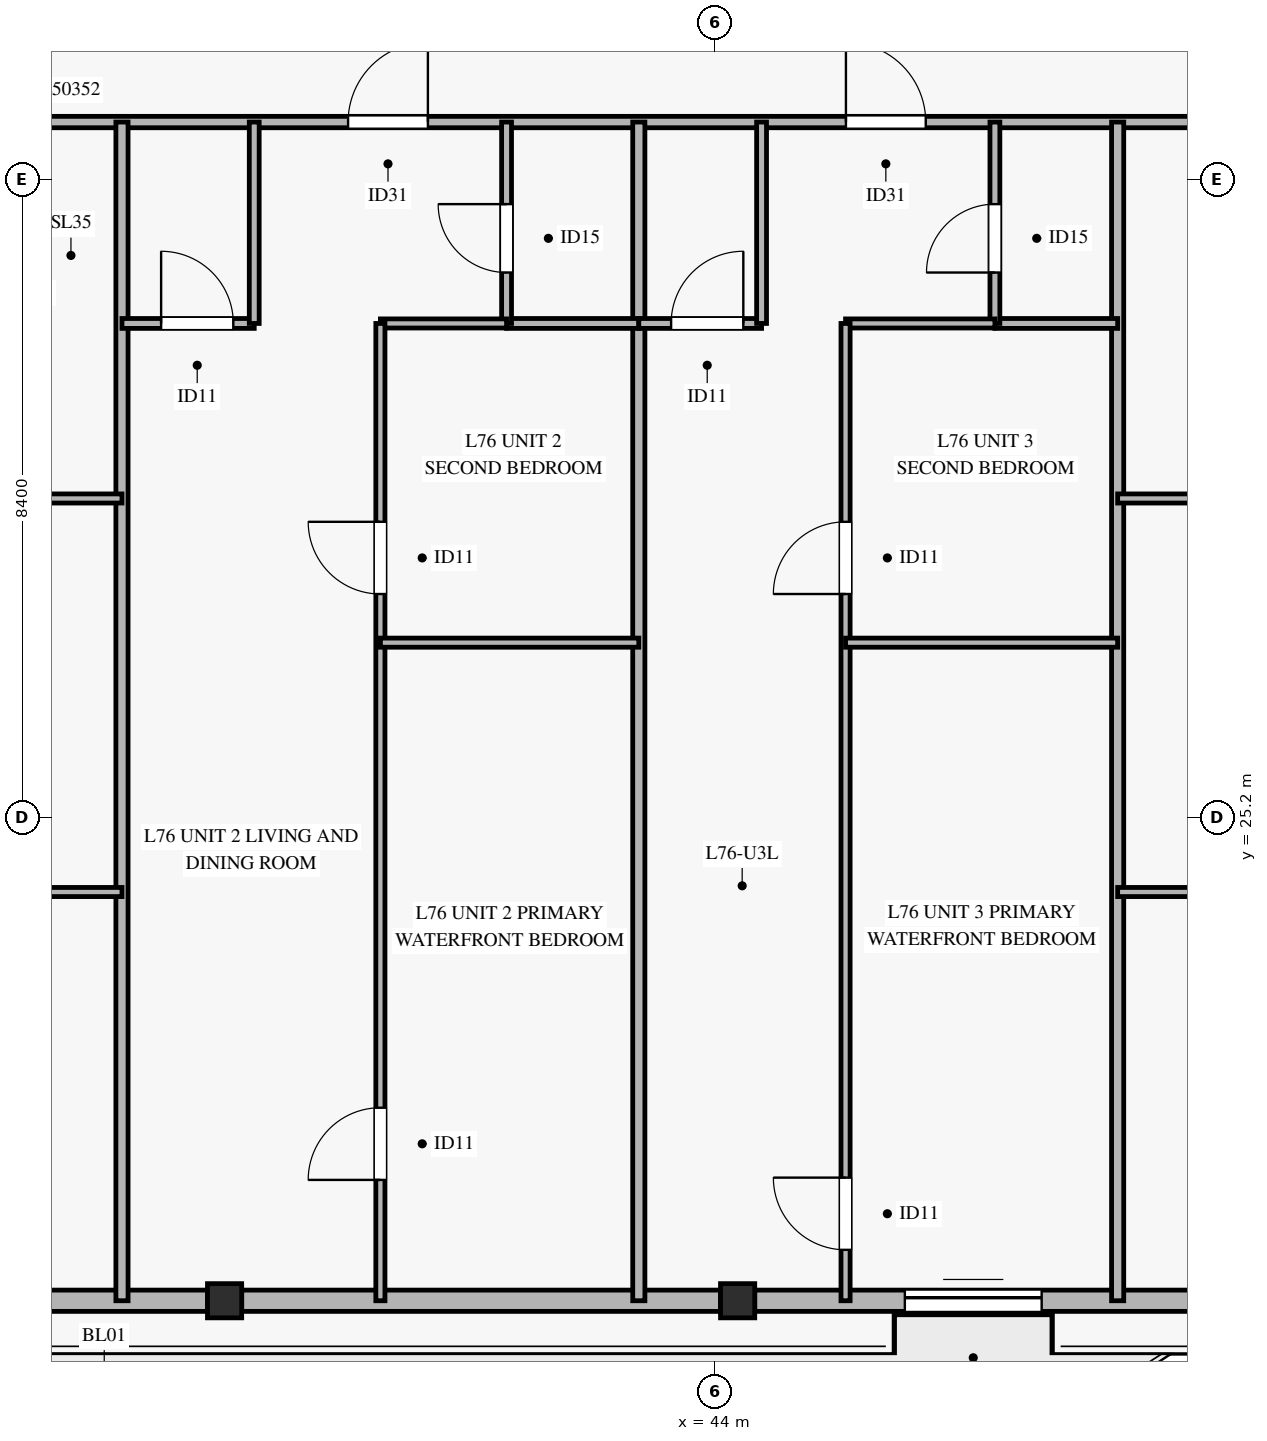
"""IFC4 building model, lengths in metres.
Left out: names, types, materials, properties, quantities, classifications, styles, units other than length and angle.
Written with IfcOpenShell. Run it as: python <this file> out.ifc"""

import sys

from ifc_helpers import new_model, si_unit, direction, frame, frame_2d, origin, origin_2d, place, context, subcontext, project, spatial, rectangle, hollow_rectangle, extrude, source, transform, mapped, element, fill, save


model = new_model("IFC4")
c1 = context("Model", 3, precision=1e-05, world=origin(), true_north=direction((0.0, 1.0)))
c2 = subcontext(c1, "Body", "Model", "MODEL_VIEW")
j1 = project(units=[si_unit("LENGTHUNIT", "METRE"), si_unit("PLANEANGLEUNIT", "RADIAN")], contexts=[c1])
p1 = place(None, origin())
s1 = spatial("IfcSite", under=j1, at=p1, CompositionType="ELEMENT")
p2 = place(p1, origin())
s2 = spatial("IfcBuilding", under=s1, at=p2, CompositionType="ELEMENT")
p3 = place(p2, frame((0.0, 0.0, 297.2)))
s3 = spatial("IfcBuildingStorey", under=s2, at=p3, CompositionType="ELEMENT", Elevation=297.2)
m1 = source(origin(), c2, "Body", "SweptSolid", [
    extrude(hollow_rectangle(XDim=0.45, YDim=0.45, WallThickness=0.022, at=origin_2d()), origin(), (0.0, 0.0, 1.0), 3.185),
])
for number, where, z_axis, x_axis in (
    (1, (37.55, 18.841, 0.0), (0.0, 0.0, 1.0), (1.0, 0.0, 0.0)),
    (2, (44.3, 18.841, 0.0), (0.0, 0.0, 1.0), (1.0, 0.0, 0.0)),
):
    element("IfcColumn", number, at=place(p3, frame(where, z_axis=z_axis, x_axis=x_axis)), inside=s3, PredefinedType="COLUMN", context=c2, shape_type="MappedRepresentation", body=[
        mapped(m1, transform((0.0, 0.0, 0.0), x_axis=(1.0, 0.0, 0.0), y_axis=(0.0, 1.0, 0.0), z_axis=(0.0, 0.0, 1.0), scale=1.0)),
    ])
for number, where, z_axis, x_axis in (
    (3, (31.025, 18.841, 0.0), (0.0, 0.0, 1.0), (1.0, 0.0, 0.0)),
    (4, (37.775, 18.841, 0.0), (0.0, 0.0, 1.0), (1.0, 0.0, 0.0)),
):
    element("IfcWall", number, at=place(p3, frame(where, z_axis=z_axis, x_axis=x_axis)), inside=s3, PredefinedType="SOLIDWALL", context=c2, shape_type="SweptSolid", body=[
        extrude(rectangle(XDim=6.3, YDim=0.28, at=frame_2d((3.15, 0.0))), origin(), (0.0, 0.0, 1.0), 2.815),
    ])
p4 = place(p3, frame((44.525, 18.841, 0.0), z_axis=(0.0, 0.0, 1.0), x_axis=(1.0, 0.0, 0.0)))
e5 = element("IfcWall", 5, at=p4, inside=s3, PredefinedType="SOLIDWALL", context=c2, shape_type="SweptSolid", body=[
    extrude(rectangle(XDim=5.8, YDim=0.28, at=frame_2d((2.9, 0.0))), origin(), (0.0, 0.0, 1.0), 2.815),
])
p5 = place(p4, frame((1.975, 0.0, 0.0)))
e6 = element("IfcOpeningElement", 6, at=p5, cuts=e5, PredefinedType="OPENING", context=c2, shape_type="SweptSolid", body=[
    extrude(rectangle(XDim=1.8, YDim=2.25, at=frame_2d((0.9, 1.125))), frame((0.0, 0.15, 0.0), z_axis=(0.0, -1.0, 0.0), x_axis=(1.0, 0.0, 0.0)), (0.0, 0.0, 1.0), 0.3),
])
p6 = place(p3, frame((10.024, 34.35, 0.0), z_axis=(0.0, 0.0, 1.0), x_axis=(1.0, 0.0, 0.0)))
e7 = element("IfcWall", 7, at=p6, inside=s3, PredefinedType="PARTITIONING", context=c2, shape_type="SweptSolid", body=[
    extrude(rectangle(XDim=50.352, YDim=0.15, at=frame_2d((25.176, 0.0))), origin(), (0.0, 0.0, 1.0), 2.47),
])
p7 = place(p6, frame((5.148, 0.0, 0.0)))
e8 = element("IfcOpeningElement", 8, at=p7, cuts=e7, PredefinedType="OPENING", context=c2, shape_type="SweptSolid", body=[
    extrude(rectangle(XDim=1.05, YDim=2.15, at=frame_2d((0.525, 1.075))), frame((0.0, 0.085, 0.0), z_axis=(0.0, -1.0, 0.0), x_axis=(1.0, 0.0, 0.0)), (0.0, 0.0, 1.0), 0.17),
])
p8 = place(p6, frame((15.651, 0.0, 0.0)))
e9 = element("IfcOpeningElement", 9, at=p8, cuts=e7, PredefinedType="OPENING", context=c2, shape_type="SweptSolid", body=[
    extrude(rectangle(XDim=1.05, YDim=2.15, at=frame_2d((0.525, 1.075))), frame((0.0, 0.085, 0.0), z_axis=(0.0, -1.0, 0.0), x_axis=(1.0, 0.0, 0.0)), (0.0, 0.0, 1.0), 0.17),
])
p9 = place(p6, frame((22.129, 0.0, 0.0)))
e10 = element("IfcOpeningElement", 10, at=p9, cuts=e7, PredefinedType="OPENING", context=c2, shape_type="SweptSolid", body=[
    extrude(rectangle(XDim=1.05, YDim=2.15, at=frame_2d((0.525, 1.075))), frame((0.0, 0.085, 0.0), z_axis=(0.0, -1.0, 0.0), x_axis=(1.0, 0.0, 0.0)), (0.0, 0.0, 1.0), 0.17),
])
p10 = place(p6, frame((29.151, 0.0, 0.0)))
e11 = element("IfcOpeningElement", 11, at=p10, cuts=e7, PredefinedType="OPENING", context=c2, shape_type="SweptSolid", body=[
    extrude(rectangle(XDim=1.05, YDim=2.15, at=frame_2d((0.525, 1.075))), frame((0.0, 0.085, 0.0), z_axis=(0.0, -1.0, 0.0), x_axis=(1.0, 0.0, 0.0)), (0.0, 0.0, 1.0), 0.17),
])
p11 = place(p6, frame((35.701, 0.0, 0.0)))
e12 = element("IfcOpeningElement", 12, at=p11, cuts=e7, PredefinedType="OPENING", context=c2, shape_type="SweptSolid", body=[
    extrude(rectangle(XDim=1.05, YDim=2.15, at=frame_2d((0.525, 1.075))), frame((0.0, 0.085, 0.0), z_axis=(0.0, -1.0, 0.0), x_axis=(1.0, 0.0, 0.0)), (0.0, 0.0, 1.0), 0.17),
])
p12 = place(p6, frame((43.578, 0.0, 0.0)))
e13 = element("IfcOpeningElement", 13, at=p12, cuts=e7, PredefinedType="OPENING", context=c2, shape_type="SweptSolid", body=[
    extrude(rectangle(XDim=1.05, YDim=2.15, at=frame_2d((0.525, 1.075))), frame((0.0, 0.085, 0.0), z_axis=(0.0, -1.0, 0.0), x_axis=(1.0, 0.0, 0.0)), (0.0, 0.0, 1.0), 0.17),
])
for number, where, z_axis, x_axis in (
    (14, (36.2, 18.841, 0.0), (0.0, 0.0, 1.0), (0.0, 1.0, 0.0)),
    (15, (43.0, 18.841, 0.0), (0.0, 0.0, 1.0), (0.0, 1.0, 0.0)),
    (16, (49.3, 18.841, 0.0), (0.0, 0.0, 1.0), (0.0, 1.0, 0.0)),
):
    element("IfcWall", number, at=place(p3, frame(where, z_axis=z_axis, x_axis=x_axis)), inside=s3, PredefinedType="PARTITIONING", context=c2, shape_type="SweptSolid", body=[
        extrude(rectangle(XDim=15.509, YDim=0.16, at=frame_2d((7.754, 0.0))), origin(), (0.0, 0.0, 1.0), 2.77),
    ])
p13 = place(p3, frame((29.4, 24.219, 0.0), z_axis=(0.0, 0.0, 1.0), x_axis=(1.0, 0.0, 0.0)))
e17 = element("IfcWall", 17, at=p13, inside=s3, PredefinedType="PARTITIONING", context=c2, shape_type="SweptSolid", body=[
    extrude(rectangle(XDim=6.8, YDim=0.12, at=frame_2d((3.4, 0.0))), origin(), (0.0, 0.0, 1.0), 2.47),
])
p14 = place(p13, frame((2.886, 0.0, 0.0)))
e18 = element("IfcOpeningElement", 18, at=p14, cuts=e17, PredefinedType="OPENING", context=c2, shape_type="SweptSolid", body=[
    extrude(rectangle(XDim=0.95, YDim=2.1, at=frame_2d((0.475, 1.05))), frame((0.0, 0.07, 0.0), z_axis=(0.0, -1.0, 0.0), x_axis=(1.0, 0.0, 0.0)), (0.0, 0.0, 1.0), 0.14),
])
p15 = place(p3, frame((29.4, 29.397, 0.0), z_axis=(0.0, 0.0, 1.0), x_axis=(1.0, 0.0, 0.0)))
e19 = element("IfcWall", 19, at=p15, inside=s3, PredefinedType="PARTITIONING", context=c2, shape_type="SweptSolid", body=[
    extrude(rectangle(XDim=6.8, YDim=0.12, at=frame_2d((3.4, 0.0))), origin(), (0.0, 0.0, 1.0), 2.47),
])
p16 = place(p15, frame((2.886, 0.0, 0.0)))
e20 = element("IfcOpeningElement", 20, at=p16, cuts=e19, PredefinedType="OPENING", context=c2, shape_type="SweptSolid", body=[
    extrude(rectangle(XDim=0.95, YDim=2.1, at=frame_2d((0.475, 1.05))), frame((0.0, 0.07, 0.0), z_axis=(0.0, -1.0, 0.0), x_axis=(1.0, 0.0, 0.0)), (0.0, 0.0, 1.0), 0.14),
])
p17 = place(p3, frame((36.2, 31.7, 0.0), z_axis=(0.0, 0.0, 1.0), x_axis=(1.0, 0.0, 0.0)))
e21 = element("IfcWall", 21, at=p17, inside=s3, PredefinedType="PARTITIONING", context=c2, shape_type="SweptSolid", body=[
    extrude(rectangle(XDim=1.74, YDim=0.13, at=frame_2d((0.87, 0.0))), origin(), (0.0, 0.0, 1.0), 2.47),
])
p18 = place(p17, frame((0.515, 0.0, 0.0)))
e22 = element("IfcOpeningElement", 22, at=p18, cuts=e21, PredefinedType="OPENING", context=c2, shape_type="SweptSolid", body=[
    extrude(rectangle(XDim=0.95, YDim=2.1, at=frame_2d((0.475, 1.05))), frame((0.0, 0.075, 0.0), z_axis=(0.0, -1.0, 0.0), x_axis=(1.0, 0.0, 0.0)), (0.0, 0.0, 1.0), 0.15),
])
p19 = place(p3, frame((37.94, 31.7, 0.0), z_axis=(0.0, 0.0, 1.0), x_axis=(0.0, 1.0, 0.0)))
e23 = element("IfcWall", 23, at=p19, inside=s3, PredefinedType="PARTITIONING", context=c2, shape_type="SweptSolid", body=[
    extrude(rectangle(XDim=2.65, YDim=0.13, at=frame_2d((1.325, 0.0))), origin(), (0.0, 0.0, 1.0), 2.77),
])
p20 = place(p3, frame((41.26, 31.7, 0.0), z_axis=(0.0, 0.0, 1.0), x_axis=(1.0, 0.0, 0.0)))
e24 = element("IfcWall", 24, at=p20, inside=s3, PredefinedType="PARTITIONING", context=c2, shape_type="SweptSolid", body=[
    extrude(rectangle(XDim=1.74, YDim=0.13, at=frame_2d((0.87, 0.0))), origin(), (0.0, 0.0, 1.0), 3.185),
])
p21 = place(p3, frame((41.26, 31.7, 0.0), z_axis=(0.0, 0.0, 1.0), x_axis=(0.0, 1.0, 0.0)))
e25 = element("IfcWall", 25, at=p21, inside=s3, PredefinedType="PARTITIONING", context=c2, shape_type="SweptSolid", body=[
    extrude(rectangle(XDim=2.65, YDim=0.13, at=frame_2d((1.325, 0.0))), origin(), (0.0, 0.0, 1.0), 2.77),
])
p22 = place(p21, frame((0.67, 0.0, 0.0)))
e26 = element("IfcOpeningElement", 26, at=p22, cuts=e25, PredefinedType="OPENING", context=c2, shape_type="SweptSolid", body=[
    extrude(rectangle(XDim=0.9, YDim=2.1, at=frame_2d((0.45, 1.05))), frame((0.0, 0.075, 0.0), z_axis=(0.0, -1.0, 0.0), x_axis=(1.0, 0.0, 0.0)), (0.0, 0.0, 1.0), 0.15),
])
p23 = place(p3, frame((39.6, 31.7, 0.0), z_axis=(0.0, 0.0, 1.0), x_axis=(1.0, 0.0, 0.0)))
e27 = element("IfcWall", 27, at=p23, inside=s3, PredefinedType="PARTITIONING", context=c2, shape_type="SweptSolid", body=[
    extrude(rectangle(XDim=1.66, YDim=0.12, at=frame_2d((0.83, 0.0))), origin(), (0.0, 0.0, 1.0), 3.185),
])
p24 = place(p3, frame((39.6, 18.841, 0.0), z_axis=(0.0, 0.0, 1.0), x_axis=(0.0, 1.0, 0.0)))
e28 = element("IfcWall", 28, at=p24, inside=s3, PredefinedType="PARTITIONING", context=c2, shape_type="SweptSolid", body=[
    extrude(rectangle(XDim=12.859, YDim=0.12, at=frame_2d((6.429, 0.0))), origin(), (0.0, 0.0, 1.0), 2.77),
])
p25 = place(p24, frame((1.59, 0.0, 0.0)))
e29 = element("IfcOpeningElement", 29, at=p25, cuts=e28, PredefinedType="OPENING", context=c2, shape_type="SweptSolid", body=[
    extrude(rectangle(XDim=0.95, YDim=2.1, at=frame_2d((0.475, 1.05))), frame((0.0, 0.07, 0.0), z_axis=(0.0, -1.0, 0.0), x_axis=(1.0, 0.0, 0.0)), (0.0, 0.0, 1.0), 0.14),
])
p26 = place(p24, frame((9.299, 0.0, 0.0)))
e30 = element("IfcOpeningElement", 30, at=p26, cuts=e28, PredefinedType="OPENING", context=c2, shape_type="SweptSolid", body=[
    extrude(rectangle(XDim=0.95, YDim=2.1, at=frame_2d((0.475, 1.05))), frame((0.0, 0.07, 0.0), z_axis=(0.0, -1.0, 0.0), x_axis=(1.0, 0.0, 0.0)), (0.0, 0.0, 1.0), 0.14),
])
p27 = place(p3, frame((39.6, 27.5, 0.0), z_axis=(0.0, 0.0, 1.0), x_axis=(1.0, 0.0, 0.0)))
e31 = element("IfcWall", 31, at=p27, inside=s3, PredefinedType="PARTITIONING", context=c2, shape_type="SweptSolid", body=[
    extrude(rectangle(XDim=3.4, YDim=0.12, at=frame_2d((1.7, 0.0))), origin(), (0.0, 0.0, 1.0), 3.185),
])
p28 = place(p3, frame((43.0, 31.7, 0.0), z_axis=(0.0, 0.0, 1.0), x_axis=(1.0, 0.0, 0.0)))
e32 = element("IfcWall", 32, at=p28, inside=s3, PredefinedType="PARTITIONING", context=c2, shape_type="SweptSolid", body=[
    extrude(rectangle(XDim=1.615, YDim=0.13, at=frame_2d((0.808, 0.0))), origin(), (0.0, 0.0, 1.0), 2.47),
])
p29 = place(p28, frame((0.425, 0.0, 0.0)))
e33 = element("IfcOpeningElement", 33, at=p29, cuts=e32, PredefinedType="OPENING", context=c2, shape_type="SweptSolid", body=[
    extrude(rectangle(XDim=0.95, YDim=2.1, at=frame_2d((0.475, 1.05))), frame((0.0, 0.075, 0.0), z_axis=(0.0, -1.0, 0.0), x_axis=(1.0, 0.0, 0.0)), (0.0, 0.0, 1.0), 0.15),
])
p30 = place(p3, frame((44.615, 31.7, 0.0), z_axis=(0.0, 0.0, 1.0), x_axis=(0.0, 1.0, 0.0)))
e34 = element("IfcWall", 34, at=p30, inside=s3, PredefinedType="PARTITIONING", context=c2, shape_type="SweptSolid", body=[
    extrude(rectangle(XDim=2.65, YDim=0.13, at=frame_2d((1.325, 0.0))), origin(), (0.0, 0.0, 1.0), 2.77),
])
p31 = place(p3, frame((47.685, 31.7, 0.0), z_axis=(0.0, 0.0, 1.0), x_axis=(1.0, 0.0, 0.0)))
e35 = element("IfcWall", 35, at=p31, inside=s3, PredefinedType="PARTITIONING", context=c2, shape_type="SweptSolid", body=[
    extrude(rectangle(XDim=1.615, YDim=0.13, at=frame_2d((0.808, 0.0))), origin(), (0.0, 0.0, 1.0), 3.185),
])
p32 = place(p3, frame((47.685, 31.7, 0.0), z_axis=(0.0, 0.0, 1.0), x_axis=(0.0, 1.0, 0.0)))
e36 = element("IfcWall", 36, at=p32, inside=s3, PredefinedType="PARTITIONING", context=c2, shape_type="SweptSolid", body=[
    extrude(rectangle(XDim=2.65, YDim=0.13, at=frame_2d((1.325, 0.0))), origin(), (0.0, 0.0, 1.0), 2.77),
])
p33 = place(p32, frame((0.67, 0.0, 0.0)))
e37 = element("IfcOpeningElement", 37, at=p33, cuts=e36, PredefinedType="OPENING", context=c2, shape_type="SweptSolid", body=[
    extrude(rectangle(XDim=0.9, YDim=2.1, at=frame_2d((0.45, 1.05))), frame((0.0, 0.075, 0.0), z_axis=(0.0, -1.0, 0.0), x_axis=(1.0, 0.0, 0.0)), (0.0, 0.0, 1.0), 0.15),
])
p34 = place(p3, frame((45.72, 31.7, 0.0), z_axis=(0.0, 0.0, 1.0), x_axis=(1.0, 0.0, 0.0)))
e38 = element("IfcWall", 38, at=p34, inside=s3, PredefinedType="PARTITIONING", context=c2, shape_type="SweptSolid", body=[
    extrude(rectangle(XDim=1.965, YDim=0.12, at=frame_2d((0.982, 0.0))), origin(), (0.0, 0.0, 1.0), 3.185),
])
p35 = place(p3, frame((45.72, 18.841, 0.0), z_axis=(0.0, 0.0, 1.0), x_axis=(0.0, 1.0, 0.0)))
e39 = element("IfcWall", 39, at=p35, inside=s3, PredefinedType="PARTITIONING", context=c2, shape_type="SweptSolid", body=[
    extrude(rectangle(XDim=12.859, YDim=0.12, at=frame_2d((6.429, 0.0))), origin(), (0.0, 0.0, 1.0), 2.77),
])
p36 = place(p35, frame((0.67, 0.0, 0.0)))
e40 = element("IfcOpeningElement", 40, at=p36, cuts=e39, PredefinedType="OPENING", context=c2, shape_type="SweptSolid", body=[
    extrude(rectangle(XDim=0.95, YDim=2.1, at=frame_2d((0.475, 1.05))), frame((0.0, 0.07, 0.0), z_axis=(0.0, -1.0, 0.0), x_axis=(1.0, 0.0, 0.0)), (0.0, 0.0, 1.0), 0.14),
])
p37 = place(p35, frame((9.299, 0.0, 0.0)))
e41 = element("IfcOpeningElement", 41, at=p37, cuts=e39, PredefinedType="OPENING", context=c2, shape_type="SweptSolid", body=[
    extrude(rectangle(XDim=0.95, YDim=2.1, at=frame_2d((0.475, 1.05))), frame((0.0, 0.07, 0.0), z_axis=(0.0, -1.0, 0.0), x_axis=(1.0, 0.0, 0.0)), (0.0, 0.0, 1.0), 0.14),
])
p38 = place(p3, frame((45.72, 27.5, 0.0), z_axis=(0.0, 0.0, 1.0), x_axis=(1.0, 0.0, 0.0)))
e42 = element("IfcWall", 42, at=p38, inside=s3, PredefinedType="PARTITIONING", context=c2, shape_type="SweptSolid", body=[
    extrude(rectangle(XDim=3.58, YDim=0.12, at=frame_2d((1.79, 0.0))), origin(), (0.0, 0.0, 1.0), 3.185),
])
p39 = place(p3, frame((49.3, 24.219, 0.0), z_axis=(0.0, 0.0, 1.0), x_axis=(1.0, 0.0, 0.0)))
e43 = element("IfcWall", 43, at=p39, inside=s3, PredefinedType="PARTITIONING", context=c2, shape_type="SweptSolid", body=[
    extrude(rectangle(XDim=11.076, YDim=0.12, at=frame_2d((5.538, 0.0))), origin(), (0.0, 0.0, 1.0), 2.47),
])
p40 = place(p39, frame((4.516, 0.0, 0.0)))
e44 = element("IfcOpeningElement", 44, at=p40, cuts=e43, PredefinedType="OPENING", context=c2, shape_type="SweptSolid", body=[
    extrude(rectangle(XDim=0.95, YDim=2.1, at=frame_2d((0.475, 1.05))), frame((0.0, 0.07, 0.0), z_axis=(0.0, -1.0, 0.0), x_axis=(1.0, 0.0, 0.0)), (0.0, 0.0, 1.0), 0.14),
])
p41 = place(p3, frame((49.3, 29.397, 0.0), z_axis=(0.0, 0.0, 1.0), x_axis=(1.0, 0.0, 0.0)))
e45 = element("IfcWall", 45, at=p41, inside=s3, PredefinedType="PARTITIONING", context=c2, shape_type="SweptSolid", body=[
    extrude(rectangle(XDim=11.076, YDim=0.12, at=frame_2d((5.538, 0.0))), origin(), (0.0, 0.0, 1.0), 2.47),
])
p42 = place(p41, frame((4.516, 0.0, 0.0)))
e46 = element("IfcOpeningElement", 46, at=p42, cuts=e45, PredefinedType="OPENING", context=c2, shape_type="SweptSolid", body=[
    extrude(rectangle(XDim=0.95, YDim=2.1, at=frame_2d((0.475, 1.05))), frame((0.0, 0.07, 0.0), z_axis=(0.0, -1.0, 0.0), x_axis=(1.0, 0.0, 0.0)), (0.0, 0.0, 1.0), 0.14),
])
m2 = source(origin(), c2, "Body", "SweptSolid", [
    extrude(rectangle(XDim=1.8, YDim=2.25, at=frame_2d((0.9, 1.125))), frame((0.0, 0.025, 0.0), z_axis=(0.0, -1.0, 0.0), x_axis=(1.0, 0.0, 0.0)), (0.0, 0.0, 1.0), 0.05),
])
p43 = place(p5, origin())
e47 = element("IfcDoor", 47, at=p43, inside=s3, OperationType="SLIDING_TO_LEFT", PredefinedType="DOOR", context=c2, shape_type="MappedRepresentation", body=[
    mapped(m2, transform((0.0, 0.0, 0.0), x_axis=(1.0, 0.0, 0.0), y_axis=(0.0, 1.0, 0.0), z_axis=(0.0, 0.0, 1.0), scale=1.0)),
])
fill(e6, e47)
m3 = source(origin(), c2, "Body", "SweptSolid", [
    extrude(rectangle(XDim=1.05, YDim=2.15, at=frame_2d((0.525, 1.075))), frame((0.0, 0.025, 0.0), z_axis=(0.0, -1.0, 0.0), x_axis=(1.0, 0.0, 0.0)), (0.0, 0.0, 1.0), 0.05),
])
p44 = place(p10, origin())
e48 = element("IfcDoor", 48, at=p44, inside=s3, OperationType="SINGLE_SWING_RIGHT", PredefinedType="DOOR", context=c2, shape_type="MappedRepresentation", body=[
    mapped(m3, transform((0.0, 0.0, 0.0), x_axis=(1.0, 0.0, 0.0), y_axis=(0.0, 1.0, 0.0), z_axis=(0.0, 0.0, 1.0), scale=1.0)),
])
fill(e11, e48)
m4 = source(origin(), c2, "Body", "SweptSolid", [
    extrude(rectangle(XDim=0.95, YDim=2.1, at=frame_2d((0.475, 1.05))), frame((0.0, 0.025, 0.0), z_axis=(0.0, -1.0, 0.0), x_axis=(1.0, 0.0, 0.0)), (0.0, 0.0, 1.0), 0.05),
])
p45 = place(p18, origin())
e49 = element("IfcDoor", 49, at=p45, inside=s3, OperationType="SINGLE_SWING_LEFT", PredefinedType="DOOR", context=c2, shape_type="MappedRepresentation", body=[
    mapped(m4, transform((0.0, 0.0, 0.0), x_axis=(1.0, 0.0, 0.0), y_axis=(0.0, 1.0, 0.0), z_axis=(0.0, 0.0, 1.0), scale=1.0)),
])
fill(e22, e49)
m5 = source(origin(), c2, "Body", "SweptSolid", [
    extrude(rectangle(XDim=0.9, YDim=2.1, at=frame_2d((0.45, 1.05))), frame((0.0, 0.025, 0.0), z_axis=(0.0, -1.0, 0.0), x_axis=(1.0, 0.0, 0.0)), (0.0, 0.0, 1.0), 0.05),
])
p46 = place(p22, origin())
e50 = element("IfcDoor", 50, at=p46, inside=s3, OperationType="SINGLE_SWING_RIGHT", PredefinedType="DOOR", context=c2, shape_type="MappedRepresentation", body=[
    mapped(m5, transform((0.0, 0.0, 0.0), x_axis=(1.0, 0.0, 0.0), y_axis=(0.0, 1.0, 0.0), z_axis=(0.0, 0.0, 1.0), scale=1.0)),
])
fill(e26, e50)
p47 = place(p25, origin())
e51 = element("IfcDoor", 51, at=p47, inside=s3, OperationType="SINGLE_SWING_LEFT", PredefinedType="DOOR", context=c2, shape_type="MappedRepresentation", body=[
    mapped(m4, transform((0.0, 0.0, 0.0), x_axis=(1.0, 0.0, 0.0), y_axis=(0.0, 1.0, 0.0), z_axis=(0.0, 0.0, 1.0), scale=1.0)),
])
fill(e29, e51)
p48 = place(p26, origin())
e52 = element("IfcDoor", 52, at=p48, inside=s3, OperationType="SINGLE_SWING_RIGHT", PredefinedType="DOOR", context=c2, shape_type="MappedRepresentation", body=[
    mapped(m4, transform((0.0, 0.0, 0.0), x_axis=(1.0, 0.0, 0.0), y_axis=(0.0, 1.0, 0.0), z_axis=(0.0, 0.0, 1.0), scale=1.0)),
])
fill(e30, e52)
p49 = place(p11, origin())
e53 = element("IfcDoor", 53, at=p49, inside=s3, OperationType="SINGLE_SWING_LEFT", PredefinedType="DOOR", context=c2, shape_type="MappedRepresentation", body=[
    mapped(m3, transform((0.0, 0.0, 0.0), x_axis=(1.0, 0.0, 0.0), y_axis=(0.0, 1.0, 0.0), z_axis=(0.0, 0.0, 1.0), scale=1.0)),
])
fill(e12, e53)
p50 = place(p29, origin())
e54 = element("IfcDoor", 54, at=p50, inside=s3, OperationType="SINGLE_SWING_RIGHT", PredefinedType="DOOR", context=c2, shape_type="MappedRepresentation", body=[
    mapped(m4, transform((0.0, 0.0, 0.0), x_axis=(1.0, 0.0, 0.0), y_axis=(0.0, 1.0, 0.0), z_axis=(0.0, 0.0, 1.0), scale=1.0)),
])
fill(e33, e54)
p51 = place(p33, origin())
e55 = element("IfcDoor", 55, at=p51, inside=s3, OperationType="SINGLE_SWING_LEFT", PredefinedType="DOOR", context=c2, shape_type="MappedRepresentation", body=[
    mapped(m5, transform((0.0, 0.0, 0.0), x_axis=(1.0, 0.0, 0.0), y_axis=(0.0, 1.0, 0.0), z_axis=(0.0, 0.0, 1.0), scale=1.0)),
])
fill(e37, e55)
p52 = place(p36, origin())
e56 = element("IfcDoor", 56, at=p52, inside=s3, OperationType="SINGLE_SWING_RIGHT", PredefinedType="DOOR", context=c2, shape_type="MappedRepresentation", body=[
    mapped(m4, transform((0.0, 0.0, 0.0), x_axis=(1.0, 0.0, 0.0), y_axis=(0.0, 1.0, 0.0), z_axis=(0.0, 0.0, 1.0), scale=1.0)),
])
fill(e40, e56)
p53 = place(p37, origin())
e57 = element("IfcDoor", 57, at=p53, inside=s3, OperationType="SINGLE_SWING_LEFT", PredefinedType="DOOR", context=c2, shape_type="MappedRepresentation", body=[
    mapped(m4, transform((0.0, 0.0, 0.0), x_axis=(1.0, 0.0, 0.0), y_axis=(0.0, 1.0, 0.0), z_axis=(0.0, 0.0, 1.0), scale=1.0)),
])
fill(e41, e57)
save(model, sys.argv[1])
